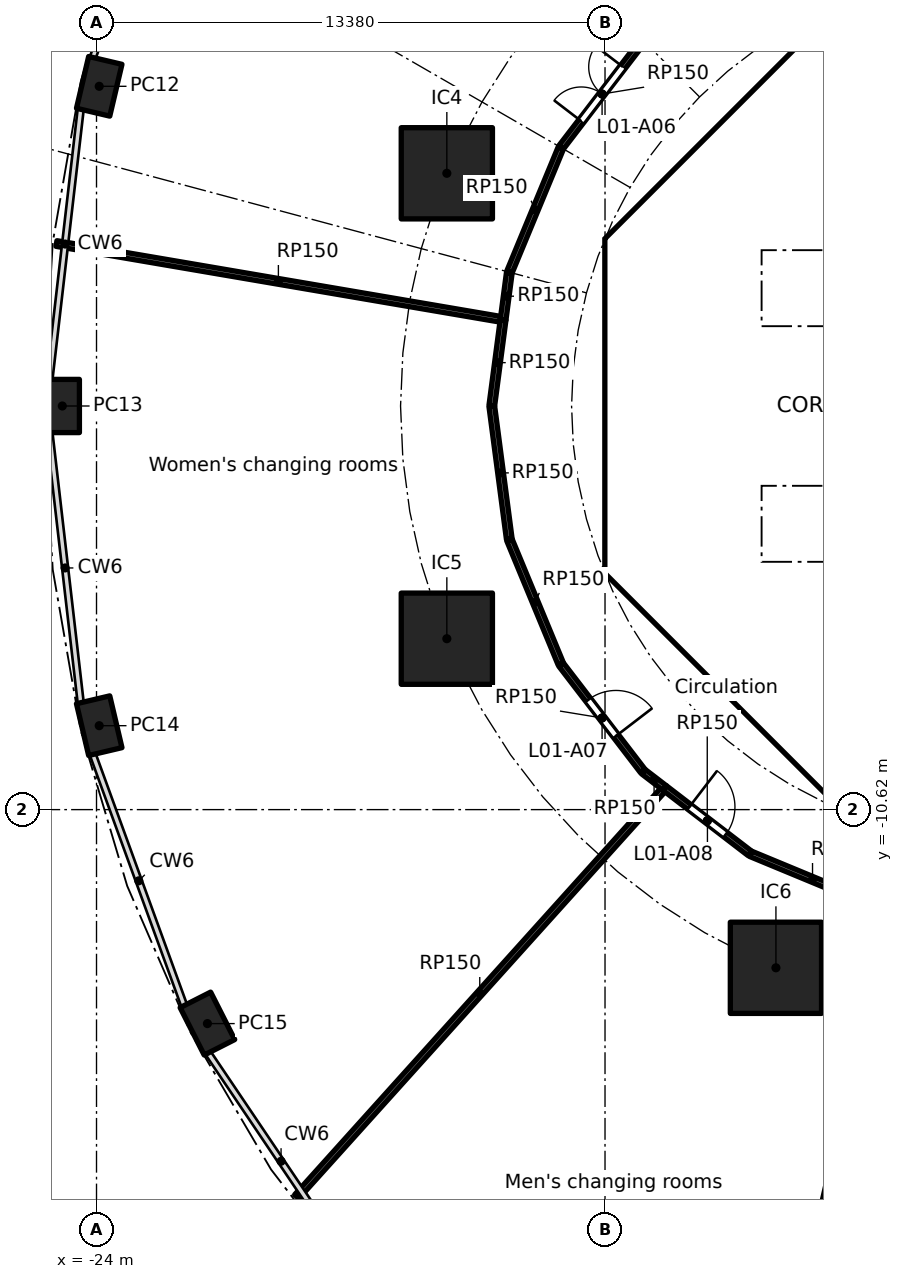
"""IFC4 building model, lengths in metres.
Left out: names, types, materials, properties, quantities, classifications, styles, units other than length and angle.
Written with IfcOpenShell. Run it as: python <this file> out.ifc"""

import sys

from ifc_helpers import new_model, si_unit, direction, frame, frame_2d, origin, origin_2d, place, context, subcontext, project, spatial, polyline, rectangle, hollow_rectangle, outline, extrude, element, fill, save


model = new_model("IFC4")
c1 = context("Model", 3, precision=1e-05, world=origin(), true_north=direction((0.0, 1.0)))
c2 = subcontext(c1, "Body", "Model", "MODEL_VIEW")
j1 = project(units=[si_unit("LENGTHUNIT", "METRE"), si_unit("PLANEANGLEUNIT", "RADIAN")], contexts=[c1])
p1 = place(None, origin())
s1 = spatial("IfcSite", under=j1, at=p1, CompositionType="ELEMENT")
p2 = place(p1, origin())
s2 = spatial("IfcBuilding", under=s1, at=p2, CompositionType="ELEMENT")
p3 = place(p2, frame((0.0, 0.0, 7.0)))
s3 = spatial("IfcBuildingStorey", under=s2, at=p3, CompositionType="ELEMENT", Elevation=7.0)
for number, where, z_axis, x_axis in (
    (1, (-23.929, 8.412, 0.0), (0.0, 0.0, 1.0), (-0.229, -0.973, 0.0)),
    (2, (-24.9, 0.0, 0.0), (0.0, 0.0, 1.0), (0.0, -1.0, 0.0)),
    (3, (-23.929, -8.412, 0.0), (0.0, 0.0, 1.0), (0.229, -0.973, 0.0)),
    (4, (-21.082, -16.25, 0.0), (0.0, 0.0, 1.0), (0.452, -0.892, 0.0)),
):
    element("IfcColumn", number, at=place(p3, frame(where, z_axis=z_axis, x_axis=x_axis)), inside=s3, PredefinedType="COLUMN", context=c2, shape_type="SweptSolid", body=[
        extrude(hollow_rectangle(XDim=1.4, YDim=0.9, WallThickness=0.05, at=origin_2d()), origin(), (0.0, 0.0, 1.0), 5.0),
    ])
for number, where, z_axis, x_axis in (
    (5, (-14.782, 6.123, 0.0), (0.0, 0.0, 1.0), (1.0, 0.0, 0.0)),
    (6, (-14.782, -6.123, 0.0), (0.0, 0.0, 1.0), (1.0, 0.0, 0.0)),
    (7, (-6.123, -14.782, 0.0), (0.0, 0.0, 1.0), (1.0, 0.0, 0.0)),
):
    element("IfcColumn", number, at=place(p3, frame(where, z_axis=z_axis, x_axis=x_axis)), inside=s3, PredefinedType="COLUMN", context=c2, shape_type="SweptSolid", body=[
        extrude(rectangle(XDim=2.4, YDim=2.4, at=origin_2d()), origin(), (0.0, 0.0, 1.0), 5.0),
    ])
p4 = place(p3, frame((-4.613, 9.988, 0.0), z_axis=(0.0, 0.0, 1.0), x_axis=(-0.707106781187, -0.707106781187, 0.0)))
e8 = element("IfcWall", 8, at=p4, inside=s3, PredefinedType="SHEAR", context=c2, shape_type="SweptSolid", body=[
    extrude(rectangle(XDim=7.602, YDim=0.6, at=frame_2d((3.801, 0.0))), origin(), (0.0, 0.0, 1.0), 4.7),
])
p5 = place(p4, frame((0.351, 0.0, 0.0)))
e9 = element("IfcOpeningElement", 9, at=p5, cuts=e8, PredefinedType="OPENING", context=c2, shape_type="SweptSolid", body=[
    extrude(rectangle(XDim=1.1, YDim=2.1, at=frame_2d((0.55, 1.05))), frame((0.0, 0.31, 0.0), z_axis=(0.0, -1.0, 0.0), x_axis=(1.0, 0.0, 0.0)), (0.0, 0.0, 1.0), 0.62),
])
p6 = place(p3, frame((-10.325, 3.801, 0.0), z_axis=(0.0, 0.0, 1.0), x_axis=(0.0, -1.0, 0.0)))
e10 = element("IfcWall", 10, at=p6, inside=s3, PredefinedType="SHEAR", context=c2, shape_type="SweptSolid", body=[
    extrude(rectangle(XDim=7.602, YDim=0.6, at=frame_2d((3.801, 0.0))), origin(), (0.0, 0.0, 1.0), 4.7),
])
p7 = place(p6, frame((0.651, 0.0, 0.0)))
e11 = element("IfcOpeningElement", 11, at=p7, cuts=e10, PredefinedType="OPENING", context=c2, shape_type="SweptSolid", body=[
    extrude(rectangle(XDim=1.5, YDim=2.1, at=frame_2d((0.75, 1.05))), frame((0.0, 0.31, 0.0), z_axis=(0.0, -1.0, 0.0), x_axis=(1.0, 0.0, 0.0)), (0.0, 0.0, 1.0), 0.62),
])
p8 = place(p6, frame((5.451, 0.0, 0.0)))
e12 = element("IfcOpeningElement", 12, at=p8, cuts=e10, PredefinedType="OPENING", context=c2, shape_type="SweptSolid", body=[
    extrude(rectangle(XDim=1.5, YDim=2.1, at=frame_2d((0.75, 1.05))), frame((0.0, 0.31, 0.0), z_axis=(0.0, -1.0, 0.0), x_axis=(1.0, 0.0, 0.0)), (0.0, 0.0, 1.0), 0.62),
])
p9 = place(p3, frame((-9.988, -4.613, 0.0), z_axis=(0.0, 0.0, 1.0), x_axis=(0.707106781187, -0.707106781187, 0.0)))
e13 = element("IfcWall", 13, at=p9, inside=s3, PredefinedType="SHEAR", context=c2, shape_type="SweptSolid", body=[
    extrude(rectangle(XDim=7.602, YDim=0.6, at=frame_2d((3.801, 0.0))), origin(), (0.0, 0.0, 1.0), 4.7),
])
p10 = place(p9, frame((6.151, 0.0, 0.0)))
e14 = element("IfcOpeningElement", 14, at=p10, cuts=e13, PredefinedType="OPENING", context=c2, shape_type="SweptSolid", body=[
    extrude(rectangle(XDim=1.1, YDim=2.1, at=frame_2d((0.55, 1.05))), frame((0.0, 0.31, 0.0), z_axis=(0.0, -1.0, 0.0), x_axis=(1.0, 0.0, 0.0)), (0.0, 0.0, 1.0), 0.62),
])
p11 = place(p3, frame((-5.8, 4.3, 0.0), z_axis=(0.0, 0.0, 1.0), x_axis=(0.0, 1.0, 0.0)))
e15 = element("IfcWall", 15, at=p11, inside=s3, PredefinedType="PARTITIONING", context=c2, shape_type="SweptSolid", body=[
    extrude(rectangle(XDim=3.927, YDim=0.15, at=frame_2d((1.963, 0.0))), origin(), (0.0, 0.0, 1.0), 4.7),
])
p12 = place(p11, frame((1.551, 0.0, 0.0)))
e16 = element("IfcOpeningElement", 16, at=p12, cuts=e15, PredefinedType="OPENING", context=c2, shape_type="SweptSolid", body=[
    extrude(rectangle(XDim=0.9, YDim=2.1, at=frame_2d((0.45, 1.05))), frame((0.0, 0.085, 0.0), z_axis=(0.0, -1.0, 0.0), x_axis=(1.0, 0.0, 0.0)), (0.0, 0.0, 1.0), 0.17),
])
p13 = place(p3, frame((-6.7, 2.0, 0.0), z_axis=(0.0, 0.0, 1.0), x_axis=(1.0, 0.0, 0.0)))
e17 = element("IfcWall", 17, at=p13, inside=s3, PredefinedType="SOLIDWALL", context=c2, shape_type="SweptSolid", body=[
    extrude(rectangle(XDim=13.4, YDim=0.2, at=frame_2d((6.7, 0.0))), origin(), (0.0, 0.0, 1.0), 4.7),
])
p14 = place(p13, frame((0.65, 0.0, 0.0)))
e18 = element("IfcOpeningElement", 18, at=p14, cuts=e17, PredefinedType="OPENING", context=c2, shape_type="SweptSolid", body=[
    extrude(rectangle(XDim=1.1, YDim=2.1, at=frame_2d((0.55, 1.05))), frame((0.0, 0.11, 0.0), z_axis=(0.0, -1.0, 0.0), x_axis=(1.0, 0.0, 0.0)), (0.0, 0.0, 1.0), 0.22),
])
p15 = place(p13, frame((2.85, 0.0, 0.0)))
e19 = element("IfcOpeningElement", 19, at=p15, cuts=e17, PredefinedType="OPENING", context=c2, shape_type="SweptSolid", body=[
    extrude(rectangle(XDim=1.1, YDim=2.1, at=frame_2d((0.55, 1.05))), frame((0.0, 0.11, 0.0), z_axis=(0.0, -1.0, 0.0), x_axis=(1.0, 0.0, 0.0)), (0.0, 0.0, 1.0), 0.22),
])
p16 = place(p13, frame((5.05, 0.0, 0.0)))
e20 = element("IfcOpeningElement", 20, at=p16, cuts=e17, PredefinedType="OPENING", context=c2, shape_type="SweptSolid", body=[
    extrude(rectangle(XDim=1.1, YDim=2.1, at=frame_2d((0.55, 1.05))), frame((0.0, 0.11, 0.0), z_axis=(0.0, -1.0, 0.0), x_axis=(1.0, 0.0, 0.0)), (0.0, 0.0, 1.0), 0.22),
])
p17 = place(p3, frame((-5.8, -8.227, 0.0), z_axis=(0.0, 0.0, 1.0), x_axis=(0.0, 1.0, 0.0)))
e21 = element("IfcWall", 21, at=p17, inside=s3, PredefinedType="PARTITIONING", context=c2, shape_type="SweptSolid", body=[
    extrude(rectangle(XDim=3.927, YDim=0.15, at=frame_2d((1.963, 0.0))), origin(), (0.0, 0.0, 1.0), 4.7),
])
p18 = place(p17, frame((1.476, 0.0, 0.0)))
e22 = element("IfcOpeningElement", 22, at=p18, cuts=e21, PredefinedType="OPENING", context=c2, shape_type="SweptSolid", body=[
    extrude(rectangle(XDim=0.9, YDim=2.1, at=frame_2d((0.45, 1.05))), frame((0.0, 0.085, 0.0), z_axis=(0.0, -1.0, 0.0), x_axis=(1.0, 0.0, 0.0)), (0.0, 0.0, 1.0), 0.17),
])
p19 = place(p3, frame((-6.7, -2.0, 0.0), z_axis=(0.0, 0.0, 1.0), x_axis=(1.0, 0.0, 0.0)))
e23 = element("IfcWall", 23, at=p19, inside=s3, PredefinedType="SOLIDWALL", context=c2, shape_type="SweptSolid", body=[
    extrude(rectangle(XDim=13.4, YDim=0.2, at=frame_2d((6.7, 0.0))), origin(), (0.0, 0.0, 1.0), 4.7),
])
p20 = place(p19, frame((0.65, 0.0, 0.0)))
e24 = element("IfcOpeningElement", 24, at=p20, cuts=e23, PredefinedType="OPENING", context=c2, shape_type="SweptSolid", body=[
    extrude(rectangle(XDim=1.1, YDim=2.1, at=frame_2d((0.55, 1.05))), frame((0.0, 0.11, 0.0), z_axis=(0.0, -1.0, 0.0), x_axis=(1.0, 0.0, 0.0)), (0.0, 0.0, 1.0), 0.22),
])
p21 = place(p19, frame((2.85, 0.0, 0.0)))
e25 = element("IfcOpeningElement", 25, at=p21, cuts=e23, PredefinedType="OPENING", context=c2, shape_type="SweptSolid", body=[
    extrude(rectangle(XDim=1.1, YDim=2.1, at=frame_2d((0.55, 1.05))), frame((0.0, 0.11, 0.0), z_axis=(0.0, -1.0, 0.0), x_axis=(1.0, 0.0, 0.0)), (0.0, 0.0, 1.0), 0.22),
])
p22 = place(p3, origin())
e26 = element("IfcWall", 26, at=p22, inside=s3, PredefinedType="SHEAR", context=c2, shape_type="SweptSolid", body=[
    extrude(outline(polyline([(-10.625, -3.801), (-10.025, -3.801), (-10.025, -4.152), (-9.776, -4.401), (-10.2, -4.825), (-10.625, -4.401), (-10.625, -3.801)])), origin(), (0.0, 0.0, 1.0), 4.7),
])
p23 = place(p3, origin())
e27 = element("IfcWall", 27, at=p23, inside=s3, PredefinedType="SHEAR", context=c2, shape_type="SweptSolid", body=[
    extrude(outline(polyline([(-10.2, 4.825), (-9.776, 4.401), (-10.025, 4.152), (-10.025, 3.801), (-10.625, 3.801), (-10.625, 4.401), (-10.2, 4.825)])), origin(), (0.0, 0.0, 1.0), 4.7),
])
p24 = place(p3, origin())
e28 = element("IfcWall", 28, at=p24, inside=s3, PredefinedType="SOLIDWALL", context=c2, shape_type="SweptSolid", body=[
    extrude(outline(polyline([(-6.7, -2.1), (-6.5, -2.1), (-6.5, -4.1), (-4.5, -4.1), (-4.5, -2.1), (-4.3, -2.1), (-4.3, -4.1), (-2.3, -4.1), (-2.3, -2.1), (-2.1, -2.1), (-2.1, -4.1), (-0.1, -4.1), (-0.1, -2.1), (0.1, -2.1), (0.1, -4.1), (2.1, -4.1), (2.1, -2.1), (2.3, -2.1), (2.3, -4.1), (4.3, -4.1), (4.3, -2.1), (4.5, -2.1), (4.5, -4.1), (6.5, -4.1), (6.5, -2.1), (6.7, -2.1), (6.7, -4.3), (-6.7, -4.3), (-6.7, -2.1)])), origin(), (0.0, 0.0, 1.0), 4.7),
])
p25 = place(p3, origin())
e29 = element("IfcWall", 29, at=p25, inside=s3, PredefinedType="SOLIDWALL", context=c2, shape_type="SweptSolid", body=[
    extrude(outline(polyline([(-6.5, 2.1), (-6.7, 2.1), (-6.7, 4.3), (6.7, 4.3), (6.7, 2.1), (6.5, 2.1), (6.5, 4.1), (4.5, 4.1), (4.5, 2.1), (4.3, 2.1), (4.3, 4.1), (2.3, 4.1), (2.3, 2.1), (2.1, 2.1), (2.1, 4.1), (0.1, 4.1), (0.1, 2.1), (-0.1, 2.1), (-0.1, 4.1), (-2.1, 4.1), (-2.1, 2.1), (-2.3, 2.1), (-2.3, 4.1), (-4.3, 4.1), (-4.3, 2.1), (-4.5, 2.1), (-4.5, 4.1), (-6.5, 4.1), (-6.5, 2.1)])), origin(), (0.0, 0.0, 1.0), 4.7),
])
for number, where, z_axis, x_axis in (
    (30, (-10.025, -4.0, 0.0), (0.0, 0.0, 1.0), (1.0, 0.0, 0.0)),
    (31, (-10.025, 4.0, 0.0), (0.0, 0.0, 1.0), (1.0, 0.0, 0.0)),
):
    element("IfcWall", number, at=place(p3, frame(where, z_axis=z_axis, x_axis=x_axis)), inside=s3, PredefinedType="PARTITIONING", context=c2, shape_type="SweptSolid", body=[
        extrude(rectangle(XDim=3.325, YDim=0.2, at=frame_2d((1.662, 0.0))), origin(), (0.0, 0.0, 1.0), 4.7),
    ])
p26 = place(p3, frame((-13.598, 0.012, 0.0), z_axis=(0.0, 0.0, 1.0), x_axis=(0.130457285505, 0.991453930679, 0.0)))
e32 = element("IfcWall", 32, at=p26, inside=s3, PredefinedType="PARTITIONING", context=c2, shape_type="SweptSolid", body=[
    extrude(rectangle(XDim=2.278, YDim=0.15, at=frame_2d((1.139, 0.0))), origin(), (0.0, 0.0, 1.0), 4.7),
])
p27 = place(p3, frame((-13.375, 2.282, 0.0), z_axis=(0.0, 0.0, 1.0), x_axis=(-0.985753347153, 0.168197320361, 0.0)))
e33 = element("IfcWall", 33, at=p27, inside=s3, PredefinedType="PARTITIONING", context=c2, shape_type="SweptSolid", body=[
    extrude(rectangle(XDim=11.847, YDim=0.15, at=frame_2d((5.924, 0.0))), origin(), (0.0, 0.0, 1.0), 4.7),
])
p28 = place(p3, frame((-13.301, 2.27, 0.0), z_axis=(0.0, 0.0, 1.0), x_axis=(0.130575867104, 0.991438320285, 0.0)))
e34 = element("IfcWall", 34, at=p28, inside=s3, PredefinedType="PARTITIONING", context=c2, shape_type="SweptSolid", body=[
    extrude(rectangle(XDim=1.249, YDim=0.15, at=frame_2d((0.625, 0.0))), origin(), (0.0, 0.0, 1.0), 4.7),
])
p29 = place(p3, frame((-13.138, -3.508, 0.0), z_axis=(0.0, 0.0, 1.0), x_axis=(-0.130499283623, 0.991448403586, 0.0)))
e35 = element("IfcWall", 35, at=p29, inside=s3, PredefinedType="PARTITIONING", context=c2, shape_type="SweptSolid", body=[
    extrude(rectangle(XDim=3.527, YDim=0.15, at=frame_2d((1.763, 0.0))), origin(), (0.0, 0.0, 1.0), 4.7),
])
for number, where, z_axis, x_axis in (
    (36, (-13.132, 3.531, 0.0), (0.0, 0.0, 1.0), (0.383, 0.924, 0.0)),
    (37, (-11.782, -6.789, 0.0), (0.0, 0.0, 1.0), (-0.383, 0.924, 0.0)),
):
    element("IfcWall", number, at=place(p3, frame(where, z_axis=z_axis, x_axis=x_axis)), inside=s3, PredefinedType="PARTITIONING", context=c2, shape_type="SweptSolid", body=[
        extrude(rectangle(XDim=3.527, YDim=0.15, at=frame_2d((1.763, 0.0))), origin(), (0.0, 0.0, 1.0), 4.7),
    ])
p30 = place(p3, frame((-11.771, 6.809, 0.0), z_axis=(0.0, 0.0, 1.0), x_axis=(0.608736710054, 0.793372307201, 0.0)))
e38 = element("IfcWall", 38, at=p30, inside=s3, PredefinedType="PARTITIONING", context=c2, shape_type="SweptSolid", body=[
    extrude(rectangle(XDim=3.527, YDim=0.15, at=frame_2d((1.763, 0.0))), origin(), (0.0, 0.0, 1.0), 4.7),
])
p31 = place(p30, frame((0.863, 0.0, 0.0)))
e39 = element("IfcOpeningElement", 39, at=p31, cuts=e38, PredefinedType="OPENING", context=c2, shape_type="SweptSolid", body=[
    extrude(rectangle(XDim=1.8, YDim=2.1, at=frame_2d((0.9, 1.05))), frame((0.0, 0.085, 0.0), z_axis=(0.0, -1.0, 0.0), x_axis=(1.0, 0.0, 0.0)), (0.0, 0.0, 1.0), 0.17),
])
p32 = place(p3, frame((-9.624, -9.607, 0.0), z_axis=(0.0, 0.0, 1.0), x_axis=(-0.608736710054, 0.793372307201, 0.0)))
e40 = element("IfcWall", 40, at=p32, inside=s3, PredefinedType="PARTITIONING", context=c2, shape_type="SweptSolid", body=[
    extrude(rectangle(XDim=3.527, YDim=0.15, at=frame_2d((1.763, 0.0))), origin(), (0.0, 0.0, 1.0), 4.7),
])
p33 = place(p32, frame((1.163, 0.0, 0.0)))
e41 = element("IfcOpeningElement", 41, at=p33, cuts=e40, PredefinedType="OPENING", context=c2, shape_type="SweptSolid", body=[
    extrude(rectangle(XDim=1.2, YDim=2.1, at=frame_2d((0.6, 1.05))), frame((0.0, 0.085, 0.0), z_axis=(0.0, -1.0, 0.0), x_axis=(1.0, 0.0, 0.0)), (0.0, 0.0, 1.0), 0.17),
])
p34 = place(p3, frame((-9.101, -10.107, 0.0), z_axis=(0.0, 0.0, 1.0), x_axis=(-0.669132472721, -0.743143144994, 0.0)))
e42 = element("IfcWall", 42, at=p34, inside=s3, PredefinedType="PARTITIONING", context=c2, shape_type="SweptSolid", body=[
    extrude(rectangle(XDim=14.392, YDim=0.15, at=frame_2d((7.196, 0.0))), origin(), (0.0, 0.0, 1.0), 4.7),
])
p35 = place(p3, frame((-9.05, -10.051, 0.0), z_axis=(0.0, 0.0, 1.0), x_axis=(-0.793399175387, 0.608701690893, 0.0)))
e43 = element("IfcWall", 43, at=p35, inside=s3, PredefinedType="PARTITIONING", context=c2, shape_type="SweptSolid", body=[
    extrude(rectangle(XDim=0.702, YDim=0.15, at=frame_2d((0.351, 0.0))), origin(), (0.0, 0.0, 1.0), 4.7),
])
p36 = place(p3, frame((-7.053, -30.552, 0.0), z_axis=(0.0, 0.0, 1.0), x_axis=(0.224943248141, 0.974371866956, 0.0)))
e44 = element("IfcWall", 44, at=p36, inside=s3, PredefinedType="PARTITIONING", context=c2, shape_type="SweptSolid", body=[
    extrude(rectangle(XDim=17.885, YDim=0.15, at=frame_2d((8.943, 0.0))), origin(), (0.0, 0.0, 1.0), 4.7),
])
p37 = place(p3, frame((-6.809, -11.771, 0.0), z_axis=(0.0, 0.0, 1.0), x_axis=(-0.793365630445, 0.608745411834, 0.0)))
e45 = element("IfcWall", 45, at=p37, inside=s3, PredefinedType="PARTITIONING", context=c2, shape_type="SweptSolid", body=[
    extrude(rectangle(XDim=2.825, YDim=0.15, at=frame_2d((1.412, 0.0))), origin(), (0.0, 0.0, 1.0), 4.7),
])
p38 = place(p37, frame((0.806, 0.0, 0.0)))
e46 = element("IfcOpeningElement", 46, at=p38, cuts=e45, PredefinedType="OPENING", context=c2, shape_type="SweptSolid", body=[
    extrude(rectangle(XDim=1.2, YDim=2.1, at=frame_2d((0.6, 1.05))), frame((0.0, 0.085, 0.0), z_axis=(0.0, -1.0, 0.0), x_axis=(1.0, 0.0, 0.0)), (0.0, 0.0, 1.0), 0.17),
])
p39 = place(p3, frame((-3.531, -13.132, 0.0), z_axis=(0.0, 0.0, 1.0), x_axis=(-0.923881838111, 0.382677866108, 0.0)))
e47 = element("IfcWall", 47, at=p39, inside=s3, PredefinedType="PARTITIONING", context=c2, shape_type="SweptSolid", body=[
    extrude(rectangle(XDim=3.527, YDim=0.15, at=frame_2d((1.763, 0.0))), origin(), (0.0, 0.0, 1.0), 4.7),
])
p40 = place(p14, origin())
e48 = element("IfcDoor", 48, at=p40, inside=s3, OperationType="DOUBLE_DOOR_SLIDING", PredefinedType="DOOR", context=c2, shape_type="SweptSolid", body=[
    extrude(rectangle(XDim=1.1, YDim=2.1, at=frame_2d((0.55, 1.05))), frame((0.0, 0.025, 0.0), z_axis=(0.0, -1.0, 0.0), x_axis=(1.0, 0.0, 0.0)), (0.0, 0.0, 1.0), 0.05),
])
fill(e18, e48)
p41 = place(p20, origin())
e49 = element("IfcDoor", 49, at=p41, inside=s3, OperationType="DOUBLE_DOOR_SLIDING", PredefinedType="DOOR", context=c2, shape_type="SweptSolid", body=[
    extrude(rectangle(XDim=1.1, YDim=2.1, at=frame_2d((0.55, 1.05))), frame((0.0, 0.025, 0.0), z_axis=(0.0, -1.0, 0.0), x_axis=(1.0, 0.0, 0.0)), (0.0, 0.0, 1.0), 0.05),
])
fill(e24, e49)
p42 = place(p12, origin())
e50 = element("IfcDoor", 50, at=p42, inside=s3, OperationType="SINGLE_SWING_LEFT", PredefinedType="DOOR", context=c2, shape_type="SweptSolid", body=[
    extrude(rectangle(XDim=0.9, YDim=2.1, at=frame_2d((0.45, 1.05))), frame((0.0, 0.025, 0.0), z_axis=(0.0, -1.0, 0.0), x_axis=(1.0, 0.0, 0.0)), (0.0, 0.0, 1.0), 0.05),
])
fill(e16, e50)
p43 = place(p18, origin())
e51 = element("IfcDoor", 51, at=p43, inside=s3, OperationType="SINGLE_SWING_LEFT", PredefinedType="DOOR", context=c2, shape_type="SweptSolid", body=[
    extrude(rectangle(XDim=0.9, YDim=2.1, at=frame_2d((0.45, 1.05))), frame((0.0, 0.025, 0.0), z_axis=(0.0, -1.0, 0.0), x_axis=(1.0, 0.0, 0.0)), (0.0, 0.0, 1.0), 0.05),
])
fill(e22, e51)
p44 = place(p7, origin())
e52 = element("IfcDoor", 52, at=p44, inside=s3, OperationType="DOUBLE_DOOR_SINGLE_SWING", PredefinedType="DOOR", context=c2, shape_type="SweptSolid", body=[
    extrude(rectangle(XDim=1.5, YDim=2.1, at=frame_2d((0.75, 1.05))), frame((0.0, 0.025, 0.0), z_axis=(0.0, -1.0, 0.0), x_axis=(1.0, 0.0, 0.0)), (0.0, 0.0, 1.0), 0.05),
])
fill(e11, e52)
p45 = place(p8, origin())
e53 = element("IfcDoor", 53, at=p45, inside=s3, OperationType="DOUBLE_DOOR_SINGLE_SWING", PredefinedType="DOOR", context=c2, shape_type="SweptSolid", body=[
    extrude(rectangle(XDim=1.5, YDim=2.1, at=frame_2d((0.75, 1.05))), frame((0.0, 0.025, 0.0), z_axis=(0.0, -1.0, 0.0), x_axis=(1.0, 0.0, 0.0)), (0.0, 0.0, 1.0), 0.05),
])
fill(e12, e53)
p46 = place(p5, origin())
e54 = element("IfcDoor", 54, at=p46, inside=s3, OperationType="SINGLE_SWING_LEFT", PredefinedType="DOOR", context=c2, shape_type="SweptSolid", body=[
    extrude(rectangle(XDim=1.1, YDim=2.1, at=frame_2d((0.55, 1.05))), frame((0.0, 0.025, 0.0), z_axis=(0.0, -1.0, 0.0), x_axis=(1.0, 0.0, 0.0)), (0.0, 0.0, 1.0), 0.05),
])
fill(e9, e54)
p47 = place(p10, origin())
e55 = element("IfcDoor", 55, at=p47, inside=s3, OperationType="SINGLE_SWING_LEFT", PredefinedType="DOOR", context=c2, shape_type="SweptSolid", body=[
    extrude(rectangle(XDim=1.1, YDim=2.1, at=frame_2d((0.55, 1.05))), frame((0.0, 0.025, 0.0), z_axis=(0.0, -1.0, 0.0), x_axis=(1.0, 0.0, 0.0)), (0.0, 0.0, 1.0), 0.05),
])
fill(e14, e55)
p48 = place(p31, origin())
e56 = element("IfcDoor", 56, at=p48, inside=s3, OperationType="DOUBLE_DOOR_SINGLE_SWING", PredefinedType="DOOR", context=c2, shape_type="SweptSolid", body=[
    extrude(rectangle(XDim=1.8, YDim=2.1, at=frame_2d((0.9, 1.05))), frame((0.0, 0.025, 0.0), z_axis=(0.0, -1.0, 0.0), x_axis=(1.0, 0.0, 0.0)), (0.0, 0.0, 1.0), 0.05),
])
fill(e39, e56)
p49 = place(p33, frame((1.2, 0.0, 0.0), x_axis=(-1.0, 0.0, 0.0)))
e57 = element("IfcDoor", 57, at=p49, inside=s3, OperationType="SINGLE_SWING_RIGHT", PredefinedType="DOOR", context=c2, shape_type="SweptSolid", body=[
    extrude(rectangle(XDim=1.2, YDim=2.1, at=frame_2d((0.6, 1.05))), frame((0.0, 0.025, 0.0), z_axis=(0.0, -1.0, 0.0), x_axis=(1.0, 0.0, 0.0)), (0.0, 0.0, 1.0), 0.05),
])
fill(e41, e57)
p50 = place(p38, frame((1.2, 0.0, 0.0), x_axis=(-1.0, 0.0, 0.0)))
e58 = element("IfcDoor", 58, at=p50, inside=s3, OperationType="SINGLE_SWING_LEFT", PredefinedType="DOOR", context=c2, shape_type="SweptSolid", body=[
    extrude(rectangle(XDim=1.2, YDim=2.1, at=frame_2d((0.6, 1.05))), frame((0.0, 0.025, 0.0), z_axis=(0.0, -1.0, 0.0), x_axis=(1.0, 0.0, 0.0)), (0.0, 0.0, 1.0), 0.05),
])
fill(e46, e58)
save(model, sys.argv[1])
